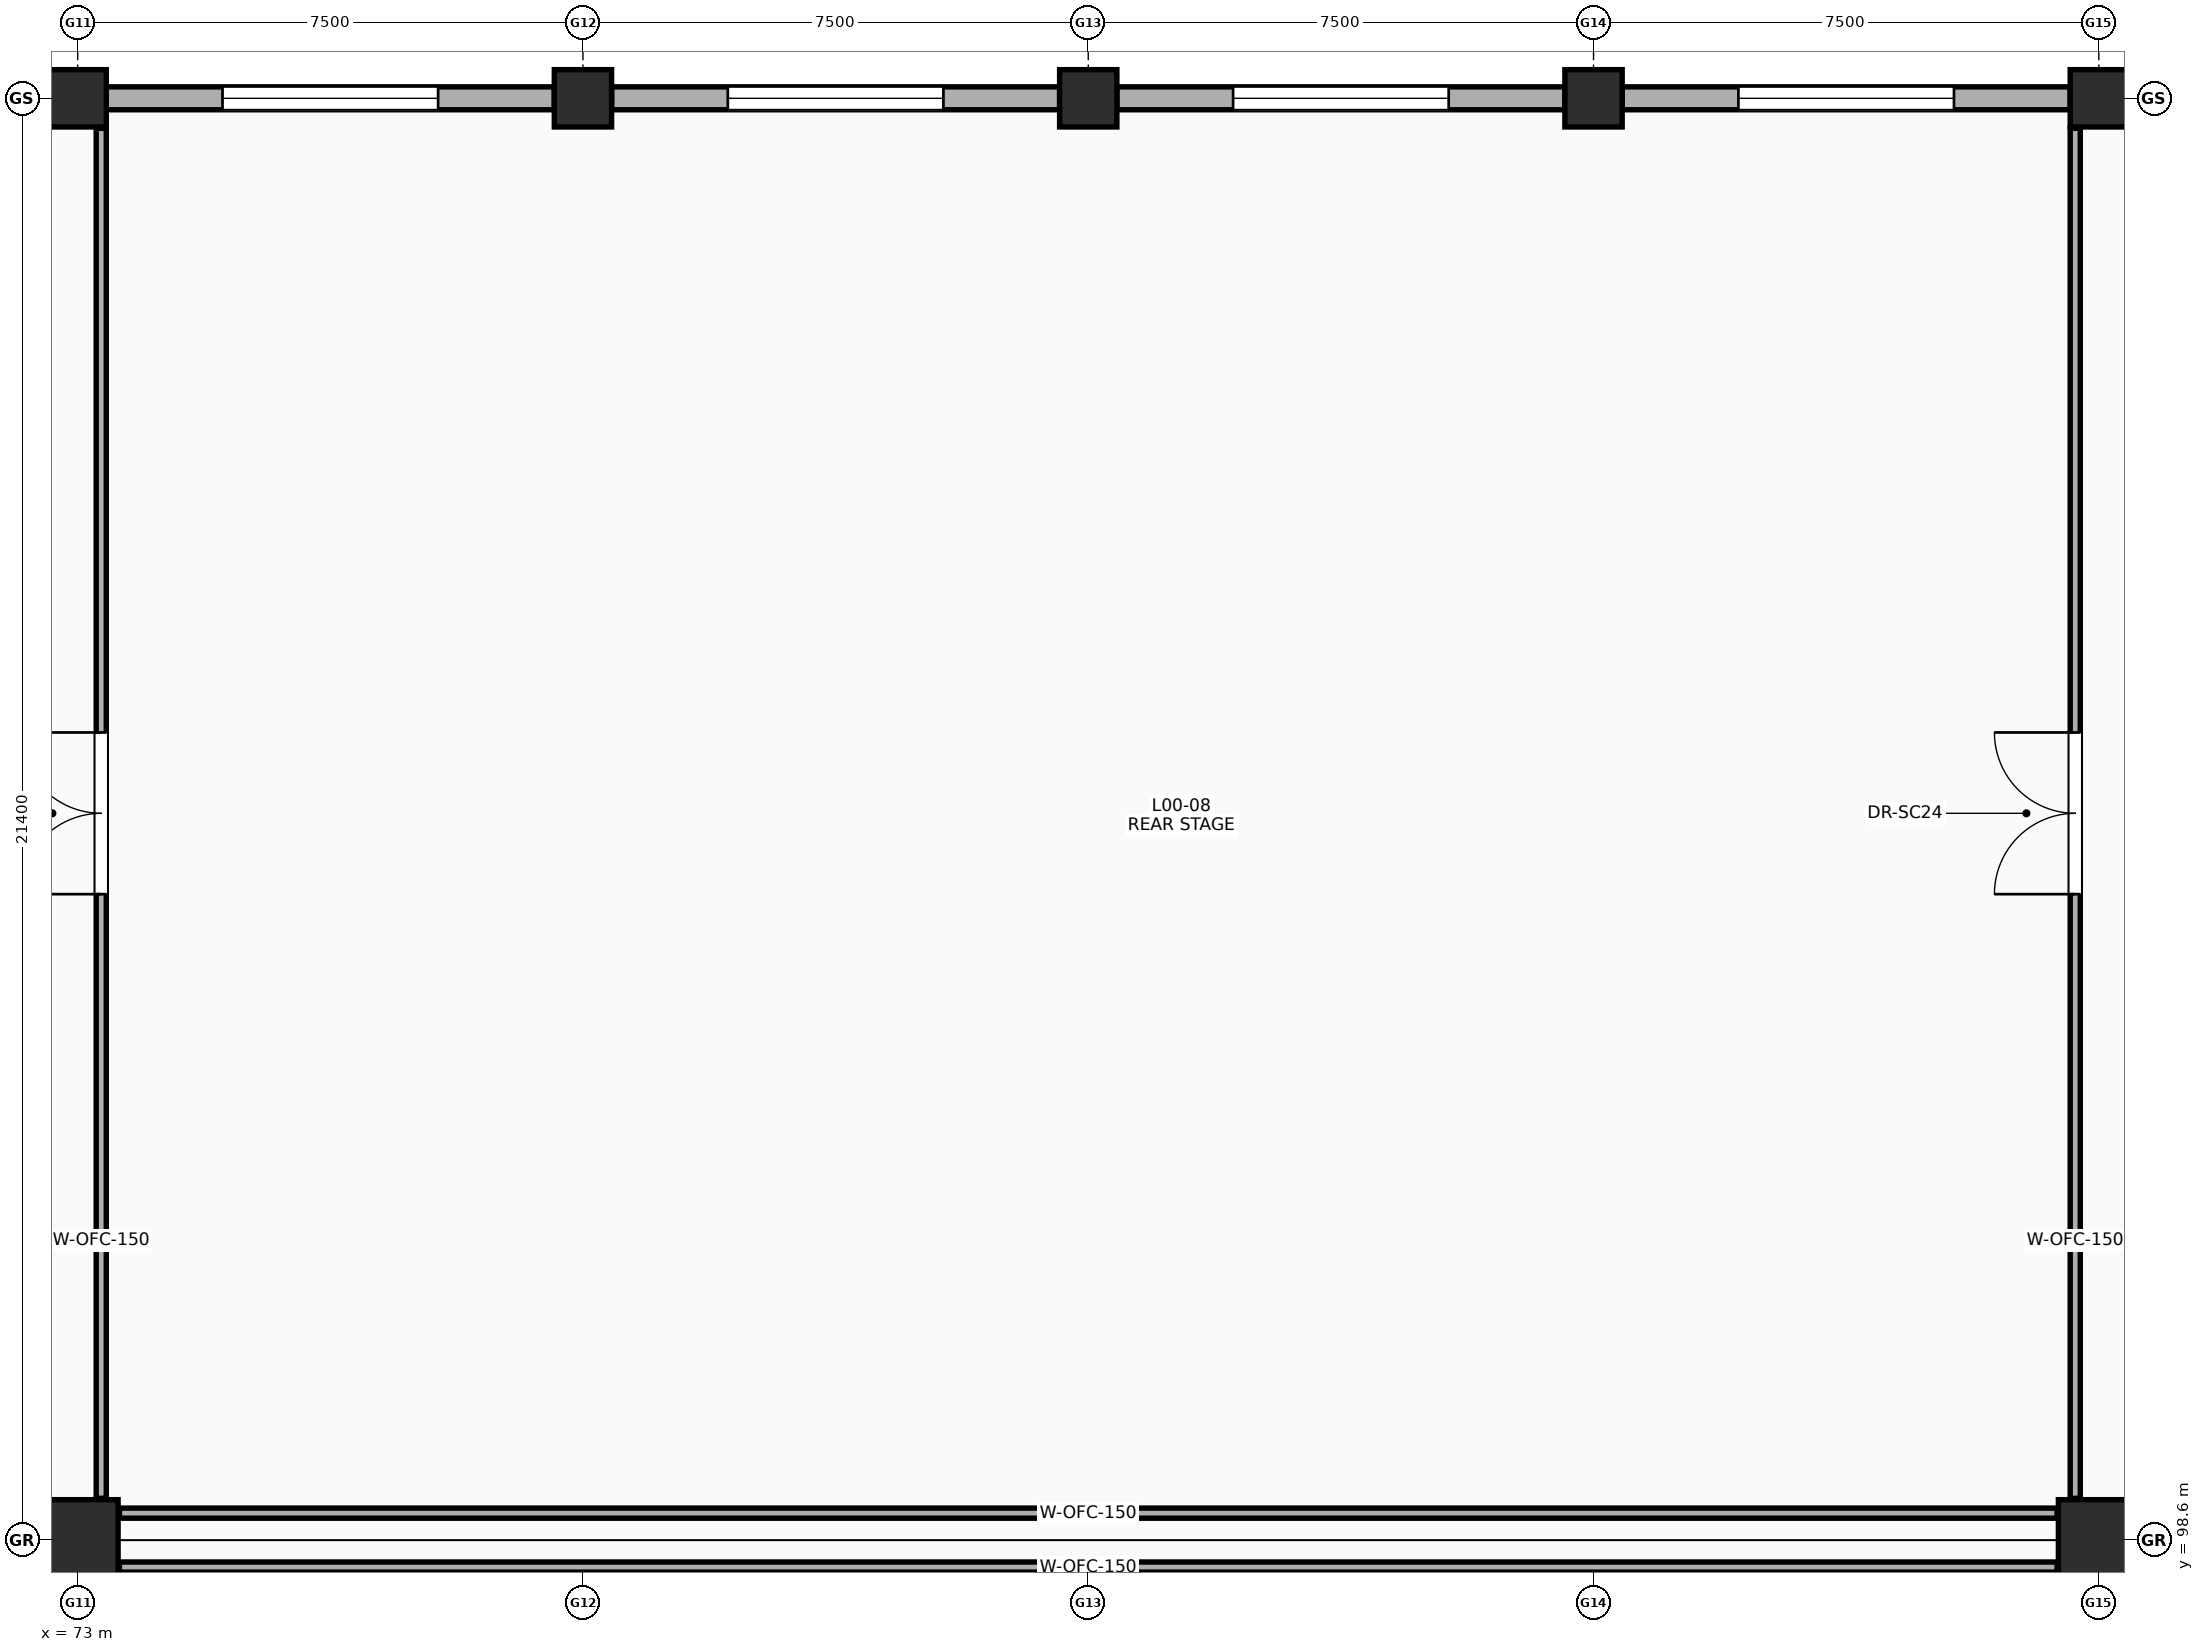
"""IFC4 building model, lengths in metres.
Left out: names, types, materials, properties, quantities, classifications, styles, units other than length and angle.
Written with IfcOpenShell. Run it as: python <this file> out.ifc"""

import sys

from ifc_helpers import new_model, si_unit, direction, frame, frame_2d, origin, origin_2d, place, context, subcontext, project, spatial, rectangle, extrude, element, fill, save


model = new_model("IFC4")
c1 = context("Model", 3, precision=1e-05, world=origin(), true_north=direction((0.0, 1.0)))
c2 = subcontext(c1, "Body", "Model", "MODEL_VIEW")
j1 = project(units=[si_unit("LENGTHUNIT", "METRE"), si_unit("PLANEANGLEUNIT", "RADIAN")], contexts=[c1])
p1 = place(None, origin())
s1 = spatial("IfcSite", under=j1, at=p1, CompositionType="ELEMENT")
p2 = place(p1, origin())
s2 = spatial("IfcBuilding", under=s1, at=p2, CompositionType="ELEMENT")
p3 = place(p2, origin())
s3 = spatial("IfcBuildingStorey", under=s2, at=p3, CompositionType="ELEMENT", Elevation=0.0)
p4 = place(p3, frame((73.0, 98.6, 0.0), z_axis=(0.0, 0.0, 1.0), x_axis=(1.0, 0.0, 0.0)))
e1 = element("IfcColumn", 1, at=p4, inside=s3, PredefinedType="COLUMN", context=c2, shape_type="SweptSolid", body=[
    extrude(rectangle(XDim=1.2, YDim=1.2, at=origin_2d()), origin(), (0.0, 0.0, 1.0), 5.4),
])
for number, where, z_axis, x_axis in (
    (2, (73.0, 120.0, 0.0), (0.0, 0.0, 1.0), (1.0, 0.0, 0.0)),
    (3, (80.5, 120.0, 0.0), (0.0, 0.0, 1.0), (1.0, 0.0, 0.0)),
    (4, (88.0, 120.0, 0.0), (0.0, 0.0, 1.0), (1.0, 0.0, 0.0)),
    (5, (95.5, 120.0, 0.0), (0.0, 0.0, 1.0), (1.0, 0.0, 0.0)),
):
    element("IfcColumn", number, at=place(p3, frame(where, z_axis=z_axis, x_axis=x_axis)), inside=s3, PredefinedType="COLUMN", context=c2, shape_type="SweptSolid", body=[
        extrude(rectangle(XDim=0.85, YDim=0.85, at=origin_2d()), origin(), (0.0, 0.0, 1.0), 5.4),
    ])
p5 = place(p3, frame((103.0, 98.6, 0.0), z_axis=(0.0, 0.0, 1.0), x_axis=(1.0, 0.0, 0.0)))
e6 = element("IfcColumn", 6, at=p5, inside=s3, PredefinedType="COLUMN", context=c2, shape_type="SweptSolid", body=[
    extrude(rectangle(XDim=1.2, YDim=1.2, at=origin_2d()), origin(), (0.0, 0.0, 1.0), 5.4),
])
p6 = place(p3, frame((103.0, 120.0, 0.0), z_axis=(0.0, 0.0, 1.0), x_axis=(1.0, 0.0, 0.0)))
e7 = element("IfcColumn", 7, at=p6, inside=s3, PredefinedType="COLUMN", context=c2, shape_type="SweptSolid", body=[
    extrude(rectangle(XDim=0.85, YDim=0.85, at=origin_2d()), origin(), (0.0, 0.0, 1.0), 5.4),
])
p7 = place(p3, frame((73.425, 120.0, 0.0), z_axis=(0.0, 0.0, 1.0), x_axis=(1.0, 0.0, 0.0)))
e8 = element("IfcWall", 8, at=p7, inside=s3, PredefinedType="SOLIDWALL", context=c2, shape_type="SweptSolid", body=[
    extrude(rectangle(XDim=6.65, YDim=0.34, at=frame_2d((3.325, 0.0))), origin(), (0.0, 0.0, 1.0), 4.15),
])
p8 = place(p7, frame((1.725, 0.0, 1.85)))
e9 = element("IfcOpeningElement", 9, at=p8, cuts=e8, PredefinedType="OPENING", context=c2, shape_type="SweptSolid", body=[
    extrude(rectangle(XDim=3.2, YDim=1.4, at=frame_2d((1.6, 0.7))), frame((0.0, 0.18, 0.0), z_axis=(0.0, -1.0, 0.0), x_axis=(1.0, 0.0, 0.0)), (0.0, 0.0, 1.0), 0.36),
])
p9 = place(p3, frame((80.925, 120.0, 0.0), z_axis=(0.0, 0.0, 1.0), x_axis=(1.0, 0.0, 0.0)))
e10 = element("IfcWall", 10, at=p9, inside=s3, PredefinedType="SOLIDWALL", context=c2, shape_type="SweptSolid", body=[
    extrude(rectangle(XDim=6.65, YDim=0.34, at=frame_2d((3.325, 0.0))), origin(), (0.0, 0.0, 1.0), 4.15),
])
p10 = place(p9, frame((1.725, 0.0, 1.85)))
e11 = element("IfcOpeningElement", 11, at=p10, cuts=e10, PredefinedType="OPENING", context=c2, shape_type="SweptSolid", body=[
    extrude(rectangle(XDim=3.2, YDim=1.4, at=frame_2d((1.6, 0.7))), frame((0.0, 0.18, 0.0), z_axis=(0.0, -1.0, 0.0), x_axis=(1.0, 0.0, 0.0)), (0.0, 0.0, 1.0), 0.36),
])
p11 = place(p3, frame((88.425, 120.0, 0.0), z_axis=(0.0, 0.0, 1.0), x_axis=(1.0, 0.0, 0.0)))
e12 = element("IfcWall", 12, at=p11, inside=s3, PredefinedType="SOLIDWALL", context=c2, shape_type="SweptSolid", body=[
    extrude(rectangle(XDim=6.65, YDim=0.34, at=frame_2d((3.325, 0.0))), origin(), (0.0, 0.0, 1.0), 4.15),
])
p12 = place(p11, frame((1.725, 0.0, 1.85)))
e13 = element("IfcOpeningElement", 13, at=p12, cuts=e12, PredefinedType="OPENING", context=c2, shape_type="SweptSolid", body=[
    extrude(rectangle(XDim=3.2, YDim=1.4, at=frame_2d((1.6, 0.7))), frame((0.0, 0.18, 0.0), z_axis=(0.0, -1.0, 0.0), x_axis=(1.0, 0.0, 0.0)), (0.0, 0.0, 1.0), 0.36),
])
p13 = place(p3, frame((95.925, 120.0, 0.0), z_axis=(0.0, 0.0, 1.0), x_axis=(1.0, 0.0, 0.0)))
e14 = element("IfcWall", 14, at=p13, inside=s3, PredefinedType="SOLIDWALL", context=c2, shape_type="SweptSolid", body=[
    extrude(rectangle(XDim=6.65, YDim=0.34, at=frame_2d((3.325, 0.0))), origin(), (0.0, 0.0, 1.0), 4.15),
])
p14 = place(p13, frame((1.725, 0.0, 1.85)))
e15 = element("IfcOpeningElement", 15, at=p14, cuts=e14, PredefinedType="OPENING", context=c2, shape_type="SweptSolid", body=[
    extrude(rectangle(XDim=3.2, YDim=1.4, at=frame_2d((1.6, 0.7))), frame((0.0, 0.18, 0.0), z_axis=(0.0, -1.0, 0.0), x_axis=(1.0, 0.0, 0.0)), (0.0, 0.0, 1.0), 0.36),
])
p15 = place(p3, frame((73.35, 99.22, 0.0), z_axis=(0.0, 0.0, 1.0), x_axis=(0.0, 1.0, 0.0)))
e16 = element("IfcWall", 16, at=p15, inside=s3, PredefinedType="PARTITIONING", context=c2, shape_type="SweptSolid", body=[
    extrude(rectangle(XDim=20.335, YDim=0.15, at=frame_2d((10.167, 0.0))), origin(), (0.0, 0.0, 1.0), 5.1),
])
p16 = place(p15, frame((8.968, 0.0, 0.0)))
e17 = element("IfcOpeningElement", 17, at=p16, cuts=e16, PredefinedType="OPENING", context=c2, shape_type="SweptSolid", body=[
    extrude(rectangle(XDim=2.4, YDim=2.6, at=frame_2d((1.2, 1.3))), frame((0.0, 0.085, 0.0), z_axis=(0.0, -1.0, 0.0), x_axis=(1.0, 0.0, 0.0)), (0.0, 0.0, 1.0), 0.17),
])
p17 = place(p3, frame((102.65, 99.22, 0.0), z_axis=(0.0, 0.0, 1.0), x_axis=(0.0, 1.0, 0.0)))
e18 = element("IfcWall", 18, at=p17, inside=s3, PredefinedType="PARTITIONING", context=c2, shape_type="SweptSolid", body=[
    extrude(rectangle(XDim=20.335, YDim=0.15, at=frame_2d((10.167, 0.0))), origin(), (0.0, 0.0, 1.0), 5.1),
])
p18 = place(p17, frame((8.968, 0.0, 0.0)))
e19 = element("IfcOpeningElement", 19, at=p18, cuts=e18, PredefinedType="OPENING", context=c2, shape_type="SweptSolid", body=[
    extrude(rectangle(XDim=2.4, YDim=2.6, at=frame_2d((1.2, 1.3))), frame((0.0, 0.085, 0.0), z_axis=(0.0, -1.0, 0.0), x_axis=(1.0, 0.0, 0.0)), (0.0, 0.0, 1.0), 0.17),
])
for number, where, z_axis, x_axis in (
    (20, (73.62, 98.2, 0.0), (0.0, 0.0, 1.0), (1.0, 0.0, 0.0)),
    (21, (73.62, 99.0, 0.0), (0.0, 0.0, 1.0), (1.0, 0.0, 0.0)),
):
    element("IfcWall", number, at=place(p3, frame(where, z_axis=z_axis, x_axis=x_axis)), inside=s3, PredefinedType="PARTITIONING", context=c2, shape_type="SweptSolid", body=[
        extrude(rectangle(XDim=28.76, YDim=0.15, at=frame_2d((14.38, 0.0))), origin(), (0.0, 0.0, 1.0), 3.78),
    ])
p19 = place(p8, origin())
e22 = element("IfcWindow", 22, at=p19, inside=s3, PartitioningType="SINGLE_PANEL", PredefinedType="WINDOW", context=c2, shape_type="SweptSolid", body=[
    extrude(rectangle(XDim=3.2, YDim=1.4, at=frame_2d((1.6, 0.7))), frame((0.0, 0.03, 0.0), z_axis=(0.0, -1.0, 0.0), x_axis=(1.0, 0.0, 0.0)), (0.0, 0.0, 1.0), 0.06),
])
fill(e9, e22)
p20 = place(p10, origin())
e23 = element("IfcWindow", 23, at=p20, inside=s3, PartitioningType="SINGLE_PANEL", PredefinedType="WINDOW", context=c2, shape_type="SweptSolid", body=[
    extrude(rectangle(XDim=3.2, YDim=1.4, at=frame_2d((1.6, 0.7))), frame((0.0, 0.03, 0.0), z_axis=(0.0, -1.0, 0.0), x_axis=(1.0, 0.0, 0.0)), (0.0, 0.0, 1.0), 0.06),
])
fill(e11, e23)
p21 = place(p12, origin())
e24 = element("IfcWindow", 24, at=p21, inside=s3, PartitioningType="SINGLE_PANEL", PredefinedType="WINDOW", context=c2, shape_type="SweptSolid", body=[
    extrude(rectangle(XDim=3.2, YDim=1.4, at=frame_2d((1.6, 0.7))), frame((0.0, 0.03, 0.0), z_axis=(0.0, -1.0, 0.0), x_axis=(1.0, 0.0, 0.0)), (0.0, 0.0, 1.0), 0.06),
])
fill(e13, e24)
p22 = place(p14, origin())
e25 = element("IfcWindow", 25, at=p22, inside=s3, PartitioningType="SINGLE_PANEL", PredefinedType="WINDOW", context=c2, shape_type="SweptSolid", body=[
    extrude(rectangle(XDim=3.2, YDim=1.4, at=frame_2d((1.6, 0.7))), frame((0.0, 0.03, 0.0), z_axis=(0.0, -1.0, 0.0), x_axis=(1.0, 0.0, 0.0)), (0.0, 0.0, 1.0), 0.06),
])
fill(e15, e25)
p23 = place(p16, origin())
e26 = element("IfcDoor", 26, at=p23, inside=s3, OperationType="DOUBLE_DOOR_SINGLE_SWING", PredefinedType="DOOR", context=c2, shape_type="SweptSolid", body=[
    extrude(rectangle(XDim=2.4, YDim=2.6, at=frame_2d((1.2, 1.3))), frame((0.0, 0.025, 0.0), z_axis=(0.0, -1.0, 0.0), x_axis=(1.0, 0.0, 0.0)), (0.0, 0.0, 1.0), 0.05),
])
fill(e17, e26)
p24 = place(p18, origin())
e27 = element("IfcDoor", 27, at=p24, inside=s3, OperationType="DOUBLE_DOOR_SINGLE_SWING", PredefinedType="DOOR", context=c2, shape_type="SweptSolid", body=[
    extrude(rectangle(XDim=2.4, YDim=2.6, at=frame_2d((1.2, 1.3))), frame((0.0, 0.025, 0.0), z_axis=(0.0, -1.0, 0.0), x_axis=(1.0, 0.0, 0.0)), (0.0, 0.0, 1.0), 0.05),
])
fill(e19, e27)
save(model, sys.argv[1])
